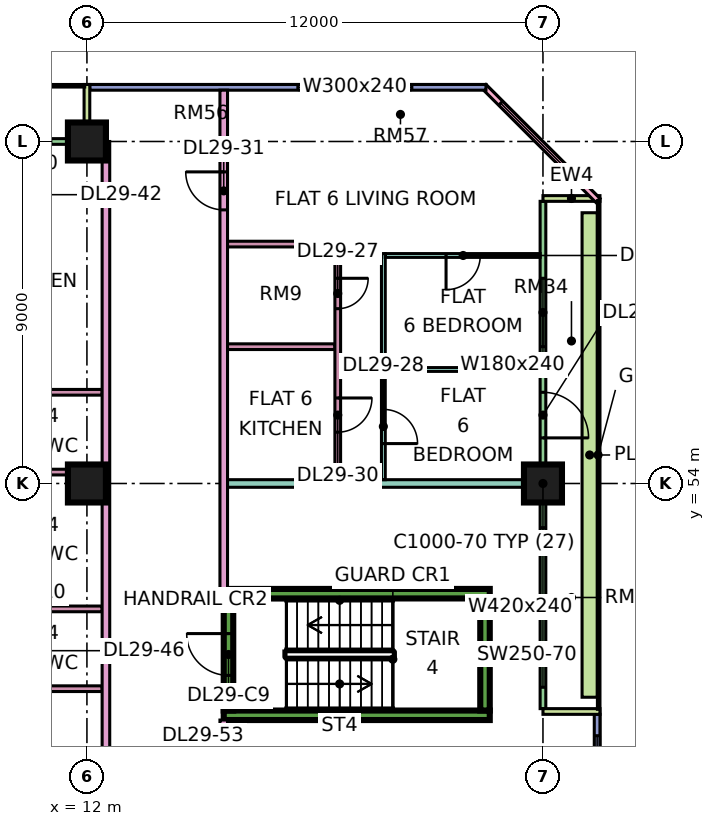
"""IFC4 building model, lengths in metres.
Left out: names, types, materials, properties, quantities, classifications, styles, units other than length and angle.
Written with IfcOpenShell. Run it as: python <this file> out.ifc"""

import sys

from ifc_helpers import new_model, si_unit, direction, frame, frame_2d, origin, origin_2d, place, context, subcontext, project, spatial, rectangle, extrude, element, fill, save


model = new_model("IFC4")
c1 = context("Model", 3, precision=1e-05, world=origin(), true_north=direction((0.0, 1.0)))
c2 = subcontext(c1, "Body", "Model", "MODEL_VIEW")
j1 = project(units=[si_unit("LENGTHUNIT", "METRE"), si_unit("PLANEANGLEUNIT", "RADIAN")], contexts=[c1])
p1 = place(None, origin())
s1 = spatial("IfcSite", under=j1, at=p1, CompositionType="ELEMENT")
p2 = place(p1, origin())
s2 = spatial("IfcBuilding", under=s1, at=p2, CompositionType="ELEMENT")
p3 = place(p2, frame((0.0, 0.0, 125.65)))
s3 = spatial("IfcBuildingStorey", under=s2, at=p3, CompositionType="ELEMENT", Elevation=125.65)
for number, where, z_axis, x_axis in (
    (1, (12.0, 54.0, 0.0), (0.0, 0.0, 1.0), (1.0, 0.0, 0.0)),
    (2, (12.0, 63.0, 0.0), (0.0, 0.0, 1.0), (1.0, 0.0, 0.0)),
    (3, (24.0, 54.0, 0.0), (0.0, 0.0, 1.0), (1.0, 0.0, 0.0)),
):
    element("IfcColumn", number, at=place(p3, frame(where, z_axis=z_axis, x_axis=x_axis)), inside=s3, PredefinedType="COLUMN", context=c2, shape_type="SweptSolid", body=[
        extrude(rectangle(XDim=1.0, YDim=1.0, at=origin_2d()), origin(), (0.0, 0.0, 1.0), 3.75),
    ])
for number, where, z_axis, x_axis in (
    (4, (15.6, 47.9, 0.0), (0.0, 0.0, 1.0), (1.0, 0.0, 0.0)),
    (5, (15.6, 51.1, 0.0), (0.0, 0.0, 1.0), (1.0, 0.0, 0.0)),
):
    element("IfcWall", number, at=place(p3, frame(where, z_axis=z_axis, x_axis=x_axis)), inside=s3, PredefinedType="SHEAR", context=c2, shape_type="SweptSolid", body=[
        extrude(rectangle(XDim=7.0, YDim=0.25, at=frame_2d((3.5, 0.0))), origin(), (0.0, 0.0, 1.0), 3.75),
    ])
p4 = place(p3, frame((15.725, 48.025, 0.0), z_axis=(0.0, 0.0, 1.0), x_axis=(0.0, 1.0, 0.0)))
e6 = element("IfcWall", 6, at=p4, inside=s3, PredefinedType="SHEAR", context=c2, shape_type="SweptSolid", body=[
    extrude(rectangle(XDim=2.95, YDim=0.25, at=frame_2d((1.475, 0.0))), origin(), (0.0, 0.0, 1.0), 3.75),
])
p5 = place(p4, frame((0.925, 0.0, 0.0)))
e7 = element("IfcOpeningElement", 7, at=p5, cuts=e6, PredefinedType="OPENING", context=c2, shape_type="SweptSolid", body=[
    extrude(rectangle(XDim=1.1, YDim=2.2, at=frame_2d((0.55, 1.1))), frame((0.0, 0.135, 0.0), z_axis=(0.0, -1.0, 0.0), x_axis=(1.0, 0.0, 0.0)), (0.0, 0.0, 1.0), 0.27),
])
p6 = place(p3, frame((22.475, 48.025, 0.0), z_axis=(0.0, 0.0, 1.0), x_axis=(0.0, 1.0, 0.0)))
e8 = element("IfcWall", 8, at=p6, inside=s3, PredefinedType="SHEAR", context=c2, shape_type="SweptSolid", body=[
    extrude(rectangle(XDim=2.95, YDim=0.25, at=frame_2d((1.475, 0.0))), origin(), (0.0, 0.0, 1.0), 3.75),
])
p7 = place(p3, frame((25.425, 40.5, 0.0), z_axis=(0.0, 0.0, 1.0), x_axis=(0.0, 1.0, 0.0)))
e9 = element("IfcWall", 9, at=p7, inside=s3, PredefinedType="SOLIDWALL", context=c2, shape_type="SweptSolid", body=[
    extrude(rectangle(XDim=7.425, YDim=0.15, at=frame_2d((3.712, 0.0))), origin(), (0.0, 0.0, 1.0), 3.35),
])
p8 = place(p7, frame((0.45, 0.0, 0.45)))
e10 = element("IfcOpeningElement", 10, at=p8, cuts=e9, PredefinedType="OPENING", context=c2, shape_type="SweptSolid", body=[
    extrude(rectangle(XDim=3.6, YDim=2.4, at=frame_2d((1.8, 1.2))), frame((0.0, 0.085, 0.0), z_axis=(0.0, -1.0, 0.0), x_axis=(1.0, 0.0, 0.0)), (0.0, 0.0, 1.0), 0.17),
])
p9 = place(p7, frame((5.062, 0.0, 0.45)))
e11 = element("IfcOpeningElement", 11, at=p9, cuts=e9, PredefinedType="OPENING", context=c2, shape_type="SweptSolid", body=[
    extrude(rectangle(XDim=1.8, YDim=2.4, at=frame_2d((0.9, 1.2))), frame((0.0, 0.085, 0.0), z_axis=(0.0, -1.0, 0.0), x_axis=(1.0, 0.0, 0.0)), (0.0, 0.0, 1.0), 0.17),
])
p10 = place(p3, frame((24.0, 48.075, 0.0), z_axis=(0.0, 0.0, 1.0), x_axis=(0.0, 1.0, 0.0)))
e12 = element("IfcWall", 12, at=p10, inside=s3, PredefinedType="SOLIDWALL", context=c2, shape_type="SweptSolid", body=[
    extrude(rectangle(XDim=13.35, YDim=0.15, at=frame_2d((6.675, 0.0))), origin(), (0.0, 0.0, 1.0), 3.35),
])
p11 = place(p10, frame((0.562, 0.0, 0.45)))
e13 = element("IfcOpeningElement", 13, at=p11, cuts=e12, PredefinedType="OPENING", context=c2, shape_type="SweptSolid", body=[
    extrude(rectangle(XDim=4.2, YDim=2.4, at=frame_2d((2.1, 1.2))), frame((0.0, 0.085, 0.0), z_axis=(0.0, -1.0, 0.0), x_axis=(1.0, 0.0, 0.0)), (0.0, 0.0, 1.0), 0.17),
])
p12 = place(p10, frame((7.125, 0.0, 0.0)))
e14 = element("IfcOpeningElement", 14, at=p12, cuts=e12, PredefinedType="OPENING", context=c2, shape_type="SweptSolid", body=[
    extrude(rectangle(XDim=1.2, YDim=2.4, at=frame_2d((0.6, 1.2))), frame((0.0, 0.085, 0.0), z_axis=(0.0, -1.0, 0.0), x_axis=(1.0, 0.0, 0.0)), (0.0, 0.0, 1.0), 0.17),
])
p13 = place(p10, frame((9.525, 0.0, 0.45)))
e15 = element("IfcOpeningElement", 15, at=p13, cuts=e12, PredefinedType="OPENING", context=c2, shape_type="SweptSolid", body=[
    extrude(rectangle(XDim=1.8, YDim=2.4, at=frame_2d((0.9, 1.2))), frame((0.0, 0.085, 0.0), z_axis=(0.0, -1.0, 0.0), x_axis=(1.0, 0.0, 0.0)), (0.0, 0.0, 1.0), 0.17),
])
for number, where, z_axis, x_axis in (
    (16, (25.5, 48.0, 0.0), (0.0, 0.0, 1.0), (-1.0, 0.0, 0.0)),
    (17, (25.5, 61.5, 0.0), (0.0, 0.0, 1.0), (-1.0, 0.0, 0.0)),
):
    element("IfcWall", number, at=place(p3, frame(where, z_axis=z_axis, x_axis=x_axis)), inside=s3, PredefinedType="SOLIDWALL", context=c2, shape_type="SweptSolid", body=[
        extrude(rectangle(XDim=1.5, YDim=0.15, at=frame_2d((0.75, 0.0))), origin(), (0.0, 0.0, 1.0), 3.35),
    ])
p14 = place(p3, frame((25.447, 61.447, 0.0), z_axis=(0.0, 0.0, 1.0), x_axis=(-0.707106781187, 0.707106781187, 0.0)))
e18 = element("IfcWall", 18, at=p14, inside=s3, PredefinedType="SOLIDWALL", context=c2, shape_type="SweptSolid", body=[
    extrude(rectangle(XDim=4.243, YDim=0.15, at=frame_2d((2.121, 0.0))), origin(), (0.0, 0.0, 1.0), 3.35),
])
p15 = place(p14, frame((0.621, 0.0, 0.45)))
e19 = element("IfcOpeningElement", 19, at=p15, cuts=e18, PredefinedType="OPENING", context=c2, shape_type="SweptSolid", body=[
    extrude(rectangle(XDim=3.0, YDim=2.4, at=frame_2d((1.5, 1.2))), frame((0.0, 0.085, 0.0), z_axis=(0.0, -1.0, 0.0), x_axis=(1.0, 0.0, 0.0)), (0.0, 0.0, 1.0), 0.17),
])
p16 = place(p3, frame((22.5, 64.425, 0.0), z_axis=(0.0, 0.0, 1.0), x_axis=(-1.0, 0.0, 0.0)))
e20 = element("IfcWall", 20, at=p16, inside=s3, PredefinedType="SOLIDWALL", context=c2, shape_type="SweptSolid", body=[
    extrude(rectangle(XDim=10.425, YDim=0.15, at=frame_2d((5.212, 0.0))), origin(), (0.0, 0.0, 1.0), 3.35),
])
p17 = place(p16, frame((1.95, 0.0, 0.45)))
e21 = element("IfcOpeningElement", 21, at=p17, cuts=e20, PredefinedType="OPENING", context=c2, shape_type="SweptSolid", body=[
    extrude(rectangle(XDim=3.0, YDim=2.4, at=frame_2d((1.5, 1.2))), frame((0.0, 0.085, 0.0), z_axis=(0.0, -1.0, 0.0), x_axis=(1.0, 0.0, 0.0)), (0.0, 0.0, 1.0), 0.17),
])
p18 = place(p3, frame((11.925, 63.0, 0.0), z_axis=(0.0, 0.0, 1.0), x_axis=(-1.0, 0.0, 0.0)))
e22 = element("IfcWall", 22, at=p18, inside=s3, PredefinedType="SOLIDWALL", context=c2, shape_type="SweptSolid", body=[
    extrude(rectangle(XDim=10.35, YDim=0.15, at=frame_2d((5.175, 0.0))), origin(), (0.0, 0.0, 1.0), 3.35),
])
p19 = place(p18, frame((0.875, 0.0, 0.45)))
e23 = element("IfcOpeningElement", 23, at=p19, cuts=e22, PredefinedType="OPENING", context=c2, shape_type="SweptSolid", body=[
    extrude(rectangle(XDim=2.4, YDim=2.4, at=frame_2d((1.2, 1.2))), frame((0.0, 0.085, 0.0), z_axis=(0.0, -1.0, 0.0), x_axis=(1.0, 0.0, 0.0)), (0.0, 0.0, 1.0), 0.17),
])
p20 = place(p18, frame((6.688, 0.0, 0.0)))
e24 = element("IfcOpeningElement", 24, at=p20, cuts=e22, PredefinedType="OPENING", context=c2, shape_type="SweptSolid", body=[
    extrude(rectangle(XDim=1.8, YDim=2.4, at=frame_2d((0.9, 1.2))), frame((0.0, 0.085, 0.0), z_axis=(0.0, -1.0, 0.0), x_axis=(1.0, 0.0, 0.0)), (0.0, 0.0, 1.0), 0.17),
])
p21 = place(p3, frame((12.0, 64.5, 0.0), z_axis=(0.0, 0.0, 1.0), x_axis=(0.0, -1.0, 0.0)))
e25 = element("IfcWall", 25, at=p21, inside=s3, PredefinedType="SOLIDWALL", context=c2, shape_type="SweptSolid", body=[
    extrude(rectangle(XDim=1.5, YDim=0.15, at=frame_2d((0.75, 0.0))), origin(), (0.0, 0.0, 1.0), 3.35),
])
p22 = place(p3, frame((25.229, 48.375, 0.0), z_axis=(0.0, 0.0, 1.0), x_axis=(0.0, 1.0, 0.0)))
e26 = element("IfcWall", 26, at=p22, inside=s3, PredefinedType="SOLIDWALL", context=c2, shape_type="SweptSolid", body=[
    extrude(rectangle(XDim=12.75, YDim=0.4, at=frame_2d((6.375, 0.0))), origin(), (0.0, 0.0, 1.0), 0.7),
])
for number, where, z_axis, x_axis in (
    (27, (8.375, 48.6, 0.0), (0.0, 0.0, 1.0), (1.0, 0.0, 0.0)),
    (28, (8.375, 50.7, 0.0), (0.0, 0.0, 1.0), (1.0, 0.0, 0.0)),
    (29, (8.375, 54.3, 0.0), (0.0, 0.0, 1.0), (1.0, 0.0, 0.0)),
    (30, (8.375, 56.4, 0.0), (0.0, 0.0, 1.0), (1.0, 0.0, 0.0)),
):
    element("IfcWall", number, at=place(p3, frame(where, z_axis=z_axis, x_axis=x_axis)), inside=s3, PredefinedType="PARTITIONING", context=c2, shape_type="SweptSolid", body=[
        extrude(rectangle(XDim=4.025, YDim=0.15, at=frame_2d((2.012, 0.0))), origin(), (0.0, 0.0, 1.0), 3.35),
    ])
p23 = place(p3, frame((12.5, 20.0, 0.0), z_axis=(0.0, 0.0, 1.0), x_axis=(0.0, 1.0, 0.0)))
e31 = element("IfcWall", 31, at=p23, inside=s3, PredefinedType="PARTITIONING", context=c2, shape_type="SweptSolid", body=[
    extrude(rectangle(XDim=43.0, YDim=0.2, at=frame_2d((21.5, 0.0))), origin(), (0.0, 0.0, 1.0), 3.35),
])
p24 = place(p23, frame((19.65, 0.0, 0.0)))
e32 = element("IfcOpeningElement", 32, at=p24, cuts=e31, PredefinedType="OPENING", context=c2, shape_type="SweptSolid", body=[
    extrude(rectangle(XDim=1.0, YDim=2.1, at=frame_2d((0.5, 1.05))), frame((0.0, 0.11, 0.0), z_axis=(0.0, -1.0, 0.0), x_axis=(1.0, 0.0, 0.0)), (0.0, 0.0, 1.0), 0.22),
])
p25 = place(p23, frame((0.6, 0.0, 0.0)))
e33 = element("IfcOpeningElement", 33, at=p25, cuts=e31, PredefinedType="OPENING", context=c2, shape_type="SweptSolid", body=[
    extrude(rectangle(XDim=1.2, YDim=2.1, at=frame_2d((0.6, 1.05))), frame((0.0, 0.11, 0.0), z_axis=(0.0, -1.0, 0.0), x_axis=(1.0, 0.0, 0.0)), (0.0, 0.0, 1.0), 0.22),
])
p26 = place(p23, frame((4.5, 0.0, 0.0)))
e34 = element("IfcOpeningElement", 34, at=p26, cuts=e31, PredefinedType="OPENING", context=c2, shape_type="SweptSolid", body=[
    extrude(rectangle(XDim=1.0, YDim=2.1, at=frame_2d((0.5, 1.05))), frame((0.0, 0.11, 0.0), z_axis=(0.0, -1.0, 0.0), x_axis=(1.0, 0.0, 0.0)), (0.0, 0.0, 1.0), 0.22),
])
p27 = place(p3, frame((15.6, 20.0, 0.0), z_axis=(0.0, 0.0, 1.0), x_axis=(0.0, 1.0, 0.0)))
e35 = element("IfcWall", 35, at=p27, inside=s3, PredefinedType="PARTITIONING", context=c2, shape_type="SweptSolid", body=[
    extrude(rectangle(XDim=27.775, YDim=0.2, at=frame_2d((13.887, 0.0))), origin(), (0.0, 0.0, 1.0), 3.35),
])
p28 = place(p27, frame((7.0, 0.0, 0.0)))
e36 = element("IfcOpeningElement", 36, at=p28, cuts=e35, PredefinedType="OPENING", context=c2, shape_type="SweptSolid", body=[
    extrude(rectangle(XDim=1.0, YDim=2.1, at=frame_2d((0.5, 1.05))), frame((0.0, 0.11, 0.0), z_axis=(0.0, -1.0, 0.0), x_axis=(1.0, 0.0, 0.0)), (0.0, 0.0, 1.0), 0.22),
])
p29 = place(p27, frame((12.95, 0.0, 0.0)))
e37 = element("IfcOpeningElement", 37, at=p29, cuts=e35, PredefinedType="OPENING", context=c2, shape_type="SweptSolid", body=[
    extrude(rectangle(XDim=1.0, YDim=2.1, at=frame_2d((0.5, 1.05))), frame((0.0, 0.11, 0.0), z_axis=(0.0, -1.0, 0.0), x_axis=(1.0, 0.0, 0.0)), (0.0, 0.0, 1.0), 0.22),
])
p30 = place(p27, frame((16.75, 0.0, 0.0)))
e38 = element("IfcOpeningElement", 38, at=p30, cuts=e35, PredefinedType="OPENING", context=c2, shape_type="SweptSolid", body=[
    extrude(rectangle(XDim=1.0, YDim=2.1, at=frame_2d((0.5, 1.05))), frame((0.0, 0.11, 0.0), z_axis=(0.0, -1.0, 0.0), x_axis=(1.0, 0.0, 0.0)), (0.0, 0.0, 1.0), 0.22),
])
p31 = place(p27, frame((1.15, 0.0, 0.0)))
e39 = element("IfcOpeningElement", 39, at=p31, cuts=e35, PredefinedType="OPENING", context=c2, shape_type="SweptSolid", body=[
    extrude(rectangle(XDim=1.8, YDim=2.1, at=frame_2d((0.9, 1.05))), frame((0.0, 0.11, 0.0), z_axis=(0.0, -1.0, 0.0), x_axis=(1.0, 0.0, 0.0)), (0.0, 0.0, 1.0), 0.22),
])
p32 = place(p27, frame((25.9, 0.0, 0.0)))
e40 = element("IfcOpeningElement", 40, at=p32, cuts=e35, PredefinedType="OPENING", context=c2, shape_type="SweptSolid", body=[
    extrude(rectangle(XDim=1.0, YDim=2.1, at=frame_2d((0.5, 1.05))), frame((0.0, 0.11, 0.0), z_axis=(0.0, -1.0, 0.0), x_axis=(1.0, 0.0, 0.0)), (0.0, 0.0, 1.0), 0.22),
])
p33 = place(p3, frame((15.6, 51.225, 0.0), z_axis=(0.0, 0.0, 1.0), x_axis=(0.0, 1.0, 0.0)))
e41 = element("IfcWall", 41, at=p33, inside=s3, PredefinedType="PARTITIONING", context=c2, shape_type="SweptSolid", body=[
    extrude(rectangle(XDim=13.125, YDim=0.2, at=frame_2d((6.562, 0.0))), origin(), (0.0, 0.0, 1.0), 3.35),
])
p34 = place(p33, frame((9.975, 0.0, 0.0)))
e42 = element("IfcOpeningElement", 42, at=p34, cuts=e41, PredefinedType="OPENING", context=c2, shape_type="SweptSolid", body=[
    extrude(rectangle(XDim=1.0, YDim=2.1, at=frame_2d((0.5, 1.05))), frame((0.0, 0.11, 0.0), z_axis=(0.0, -1.0, 0.0), x_axis=(1.0, 0.0, 0.0)), (0.0, 0.0, 1.0), 0.22),
])
p35 = place(p3, frame((15.7, 54.0, 0.0), z_axis=(0.0, 0.0, 1.0), x_axis=(1.0, 0.0, 0.0)))
e43 = element("IfcWall", 43, at=p35, inside=s3, PredefinedType="PARTITIONING", context=c2, shape_type="SweptSolid", body=[
    extrude(rectangle(XDim=8.226, YDim=0.2, at=frame_2d((4.113, 0.0))), origin(), (0.0, 0.0, 1.0), 3.35),
])
for number, where, z_axis, x_axis in (
    (44, (15.7, 57.6, 0.0), (0.0, 0.0, 1.0), (1.0, 0.0, 0.0)),
    (45, (15.7, 60.3, 0.0), (0.0, 0.0, 1.0), (1.0, 0.0, 0.0)),
):
    element("IfcWall", number, at=place(p3, frame(where, z_axis=z_axis, x_axis=x_axis)), inside=s3, PredefinedType="PARTITIONING", context=c2, shape_type="SweptSolid", body=[
        extrude(rectangle(XDim=2.825, YDim=0.15, at=frame_2d((1.413, 0.0))), origin(), (0.0, 0.0, 1.0), 3.35),
    ])
p36 = place(p3, frame((18.6, 54.1, 0.0), z_axis=(0.0, 0.0, 1.0), x_axis=(0.0, 1.0, 0.0)))
e46 = element("IfcWall", 46, at=p36, inside=s3, PredefinedType="PARTITIONING", context=c2, shape_type="SweptSolid", body=[
    extrude(rectangle(XDim=6.275, YDim=0.15, at=frame_2d((3.137, 0.0))), origin(), (0.0, 0.0, 1.0), 3.35),
])
p37 = place(p36, frame((4.5, 0.0, 0.0)))
e47 = element("IfcOpeningElement", 47, at=p37, cuts=e46, PredefinedType="OPENING", context=c2, shape_type="SweptSolid", body=[
    extrude(rectangle(XDim=0.8, YDim=2.1, at=frame_2d((0.4, 1.05))), frame((0.0, 0.085, 0.0), z_axis=(0.0, -1.0, 0.0), x_axis=(1.0, 0.0, 0.0)), (0.0, 0.0, 1.0), 0.17),
])
p38 = place(p36, frame((1.25, 0.0, 0.0)))
e48 = element("IfcOpeningElement", 48, at=p38, cuts=e46, PredefinedType="OPENING", context=c2, shape_type="SweptSolid", body=[
    extrude(rectangle(XDim=0.9, YDim=2.1, at=frame_2d((0.45, 1.05))), frame((0.0, 0.085, 0.0), z_axis=(0.0, -1.0, 0.0), x_axis=(1.0, 0.0, 0.0)), (0.0, 0.0, 1.0), 0.17),
])
p39 = place(p3, frame((19.8, 54.1, 0.0), z_axis=(0.0, 0.0, 1.0), x_axis=(0.0, 1.0, 0.0)))
e49 = element("IfcWall", 49, at=p39, inside=s3, PredefinedType="PARTITIONING", context=c2, shape_type="SweptSolid", body=[
    extrude(rectangle(XDim=5.95, YDim=0.1, at=frame_2d((2.975, 0.0))), origin(), (0.0, 0.0, 1.0), 3.35),
])
p40 = place(p39, frame((0.95, 0.0, 0.0)))
e50 = element("IfcOpeningElement", 50, at=p40, cuts=e49, PredefinedType="OPENING", context=c2, shape_type="SweptSolid", body=[
    extrude(rectangle(XDim=0.9, YDim=2.1, at=frame_2d((0.45, 1.05))), frame((0.0, 0.06, 0.0), z_axis=(0.0, -1.0, 0.0), x_axis=(1.0, 0.0, 0.0)), (0.0, 0.0, 1.0), 0.12),
])
p41 = place(p3, frame((19.85, 57.0, 0.0), z_axis=(0.0, 0.0, 1.0), x_axis=(1.0, 0.0, 0.0)))
e51 = element("IfcWall", 51, at=p41, inside=s3, PredefinedType="PARTITIONING", context=c2, shape_type="SweptSolid", body=[
    extrude(rectangle(XDim=4.076, YDim=0.1, at=frame_2d((2.038, 0.0))), origin(), (0.0, 0.0, 1.0), 3.35),
])
p42 = place(p3, frame((19.85, 60.0, 0.0), z_axis=(0.0, 0.0, 1.0), x_axis=(1.0, 0.0, 0.0)))
e52 = element("IfcWall", 52, at=p42, inside=s3, PredefinedType="PARTITIONING", context=c2, shape_type="SweptSolid", body=[
    extrude(rectangle(XDim=4.076, YDim=0.1, at=frame_2d((2.038, 0.0))), origin(), (0.0, 0.0, 1.0), 3.35),
])
p43 = place(p42, frame((1.6, 0.0, 0.0)))
e53 = element("IfcOpeningElement", 53, at=p43, cuts=e52, PredefinedType="OPENING", context=c2, shape_type="SweptSolid", body=[
    extrude(rectangle(XDim=0.9, YDim=2.1, at=frame_2d((0.45, 1.05))), frame((0.0, 0.06, 0.0), z_axis=(0.0, -1.0, 0.0), x_axis=(1.0, 0.0, 0.0)), (0.0, 0.0, 1.0), 0.12),
])
p44 = place(p9, origin())
e54 = element("IfcWindow", 54, at=p44, inside=s3, PartitioningType="SINGLE_PANEL", PredefinedType="WINDOW", context=c2, shape_type="SweptSolid", body=[
    extrude(rectangle(XDim=1.8, YDim=2.4, at=frame_2d((0.9, 1.2))), frame((0.0, 0.03, 0.0), z_axis=(0.0, -1.0, 0.0), x_axis=(1.0, 0.0, 0.0)), (0.0, 0.0, 1.0), 0.06),
])
fill(e11, e54)
p45 = place(p11, origin())
e55 = element("IfcWindow", 55, at=p45, inside=s3, PartitioningType="SINGLE_PANEL", PredefinedType="WINDOW", context=c2, shape_type="SweptSolid", body=[
    extrude(rectangle(XDim=4.2, YDim=2.4, at=frame_2d((2.1, 1.2))), frame((0.0, 0.03, 0.0), z_axis=(0.0, -1.0, 0.0), x_axis=(1.0, 0.0, 0.0)), (0.0, 0.0, 1.0), 0.06),
])
fill(e13, e55)
p46 = place(p12, frame((1.2, 0.0, 0.0), z_axis=(0.0, 0.0, 1.0), x_axis=(-1.0, 0.0, 0.0)))
e56 = element("IfcDoor", 56, at=p46, inside=s3, OperationType="DOUBLE_DOOR_SINGLE_SWING", PredefinedType="DOOR", context=c2, shape_type="SweptSolid", body=[
    extrude(rectangle(XDim=1.2, YDim=2.4, at=frame_2d((0.6, 1.2))), frame((0.0, 0.025, 0.0), z_axis=(0.0, -1.0, 0.0), x_axis=(1.0, 0.0, 0.0)), (0.0, 0.0, 1.0), 0.05),
])
fill(e14, e56)
p47 = place(p13, origin())
e57 = element("IfcWindow", 57, at=p47, inside=s3, PartitioningType="SINGLE_PANEL", PredefinedType="WINDOW", context=c2, shape_type="SweptSolid", body=[
    extrude(rectangle(XDim=1.8, YDim=2.4, at=frame_2d((0.9, 1.2))), frame((0.0, 0.03, 0.0), z_axis=(0.0, -1.0, 0.0), x_axis=(1.0, 0.0, 0.0)), (0.0, 0.0, 1.0), 0.06),
])
fill(e15, e57)
p48 = place(p15, origin())
e58 = element("IfcWindow", 58, at=p48, inside=s3, PartitioningType="SINGLE_PANEL", PredefinedType="WINDOW", context=c2, shape_type="SweptSolid", body=[
    extrude(rectangle(XDim=3.0, YDim=2.4, at=frame_2d((1.5, 1.2))), frame((0.0, 0.03, 0.0), z_axis=(0.0, -1.0, 0.0), x_axis=(1.0, 0.0, 0.0)), (0.0, 0.0, 1.0), 0.06),
])
fill(e19, e58)
p49 = place(p17, origin())
e59 = element("IfcWindow", 59, at=p49, inside=s3, PartitioningType="SINGLE_PANEL", PredefinedType="WINDOW", context=c2, shape_type="SweptSolid", body=[
    extrude(rectangle(XDim=3.0, YDim=2.4, at=frame_2d((1.5, 1.2))), frame((0.0, 0.03, 0.0), z_axis=(0.0, -1.0, 0.0), x_axis=(1.0, 0.0, 0.0)), (0.0, 0.0, 1.0), 0.06),
])
fill(e21, e59)
p50 = place(p5, frame((1.1, 0.0, 0.0), z_axis=(0.0, 0.0, 1.0), x_axis=(-1.0, 0.0, 0.0)))
e60 = element("IfcDoor", 60, at=p50, inside=s3, OperationType="SINGLE_SWING_RIGHT", PredefinedType="DOOR", context=c2, shape_type="SweptSolid", body=[
    extrude(rectangle(XDim=1.1, YDim=2.2, at=frame_2d((0.55, 1.1))), frame((0.0, 0.025, 0.0), z_axis=(0.0, -1.0, 0.0), x_axis=(1.0, 0.0, 0.0)), (0.0, 0.0, 1.0), 0.05),
])
fill(e7, e60)
p51 = place(p37, origin())
e61 = element("IfcDoor", 61, at=p51, inside=s3, OperationType="SINGLE_SWING_RIGHT", PredefinedType="DOOR", context=c2, shape_type="SweptSolid", body=[
    extrude(rectangle(XDim=0.8, YDim=2.1, at=frame_2d((0.4, 1.05))), frame((0.0, 0.025, 0.0), z_axis=(0.0, -1.0, 0.0), x_axis=(1.0, 0.0, 0.0)), (0.0, 0.0, 1.0), 0.05),
])
fill(e47, e61)
p52 = place(p40, frame((0.9, 0.0, 0.0), z_axis=(0.0, 0.0, 1.0), x_axis=(-1.0, 0.0, 0.0)))
e62 = element("IfcDoor", 62, at=p52, inside=s3, OperationType="SINGLE_SWING_LEFT", PredefinedType="DOOR", context=c2, shape_type="SweptSolid", body=[
    extrude(rectangle(XDim=0.9, YDim=2.1, at=frame_2d((0.45, 1.05))), frame((0.0, 0.025, 0.0), z_axis=(0.0, -1.0, 0.0), x_axis=(1.0, 0.0, 0.0)), (0.0, 0.0, 1.0), 0.05),
])
fill(e50, e62)
p53 = place(p43, frame((0.9, 0.0, 0.0), z_axis=(0.0, 0.0, 1.0), x_axis=(-1.0, 0.0, 0.0)))
e63 = element("IfcDoor", 63, at=p53, inside=s3, OperationType="SINGLE_SWING_LEFT", PredefinedType="DOOR", context=c2, shape_type="SweptSolid", body=[
    extrude(rectangle(XDim=0.9, YDim=2.1, at=frame_2d((0.45, 1.05))), frame((0.0, 0.025, 0.0), z_axis=(0.0, -1.0, 0.0), x_axis=(1.0, 0.0, 0.0)), (0.0, 0.0, 1.0), 0.05),
])
fill(e53, e63)
p54 = place(p38, origin())
e64 = element("IfcDoor", 64, at=p54, inside=s3, OperationType="SINGLE_SWING_RIGHT", PredefinedType="DOOR", context=c2, shape_type="SweptSolid", body=[
    extrude(rectangle(XDim=0.9, YDim=2.1, at=frame_2d((0.45, 1.05))), frame((0.0, 0.025, 0.0), z_axis=(0.0, -1.0, 0.0), x_axis=(1.0, 0.0, 0.0)), (0.0, 0.0, 1.0), 0.05),
])
fill(e48, e64)
p55 = place(p34, frame((1.0, 0.0, 0.0), z_axis=(0.0, 0.0, 1.0), x_axis=(-1.0, 0.0, 0.0)))
e65 = element("IfcDoor", 65, at=p55, inside=s3, OperationType="SINGLE_SWING_RIGHT", PredefinedType="DOOR", context=c2, shape_type="SweptSolid", body=[
    extrude(rectangle(XDim=1.0, YDim=2.1, at=frame_2d((0.5, 1.05))), frame((0.0, 0.025, 0.0), z_axis=(0.0, -1.0, 0.0), x_axis=(1.0, 0.0, 0.0)), (0.0, 0.0, 1.0), 0.05),
])
fill(e42, e65)
save(model, sys.argv[1])
